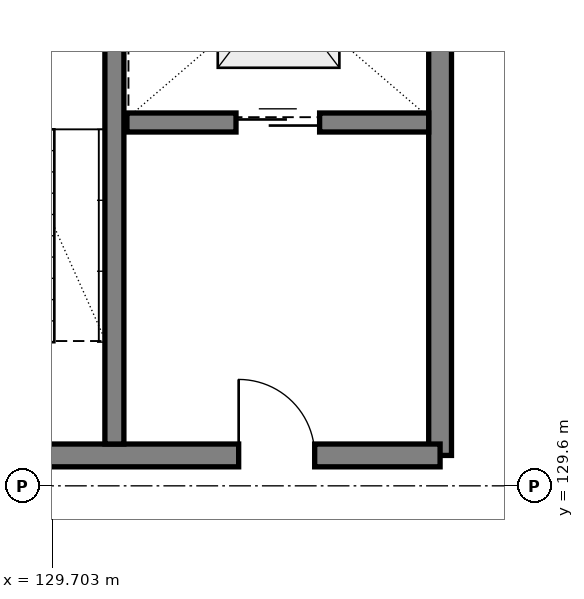
"""IFC4 building model, lengths in metres.
Left out: names, types, materials, properties, quantities, classifications, styles, units other than length and angle.
Written with IfcOpenShell. Run it as: python <this file> out.ifc"""

import sys

from ifc_helpers import new_model, si_unit, direction, frame, frame_2d, origin, place, context, subcontext, project, spatial, rectangle, extrude, element, fill, save


model = new_model("IFC4")
c1 = context("Model", 3, precision=1e-05, world=origin(), true_north=direction((0.0, 1.0)))
c2 = subcontext(c1, "Body", "Model", "MODEL_VIEW")
j1 = project(units=[si_unit("LENGTHUNIT", "METRE"), si_unit("PLANEANGLEUNIT", "RADIAN")], contexts=[c1])
p1 = place(None, origin())
s1 = spatial("IfcSite", under=j1, at=p1, CompositionType="ELEMENT")
p2 = place(p1, origin())
s2 = spatial("IfcBuilding", under=s1, at=p2, CompositionType="ELEMENT")
p3 = place(p2, frame((0.0, 0.0, 4.5)))
s3 = spatial("IfcBuildingStorey", under=s2, at=p3, CompositionType="ELEMENT", Elevation=4.5)
p4 = place(p3, frame((134.8, 130.0, 0.0), z_axis=(0.0, 0.0, 1.0), x_axis=(0.0, 1.0, 0.0)))
e1 = element("IfcWall", 1, at=p4, inside=s3, PredefinedType="SHEAR", context=c2, shape_type="SweptSolid", body=[
    extrude(rectangle(XDim=8.0, YDim=0.3, at=frame_2d((4.0, 0.0), x_axis=(1.0, 0.0))), origin(), (0.0, 0.0, 1.0), 3.9),
])
p5 = place(p3, frame((127.4, 130.0, 0.0), z_axis=(0.0, 0.0, 1.0), x_axis=(1.0, 0.0, 0.0)))
e2 = element("IfcWall", 2, at=p5, inside=s3, PredefinedType="SHEAR", context=c2, shape_type="SweptSolid", body=[
    extrude(rectangle(XDim=7.4, YDim=0.3, at=frame_2d((3.7, 0.0), x_axis=(1.0, 0.0))), origin(), (0.0, 0.0, 1.0), 3.9),
])
p6 = place(p5, frame((1.1, 0.0, 0.0)))
e3 = element("IfcOpeningElement", 3, at=p6, cuts=e2, PredefinedType="OPENING", context=c2, shape_type="SweptSolid", body=[
    extrude(rectangle(XDim=1.0, YDim=2.15, at=frame_2d((0.5, 1.075), x_axis=(1.0, 0.0))), frame((0.0, 0.16, 0.0), z_axis=(0.0, -1.0, 0.0), x_axis=(1.0, 0.0, 0.0)), (0.0, 0.0, 1.0), 0.32),
])
p7 = place(p5, frame((4.75, 0.0, 0.0)))
e4 = element("IfcOpeningElement", 4, at=p7, cuts=e2, PredefinedType="OPENING", context=c2, shape_type="SweptSolid", body=[
    extrude(rectangle(XDim=1.0, YDim=2.15, at=frame_2d((0.5, 1.075), x_axis=(1.0, 0.0))), frame((0.0, 0.16, 0.0), z_axis=(0.0, -1.0, 0.0), x_axis=(1.0, 0.0, 0.0)), (0.0, 0.0, 1.0), 0.32),
])
p8 = place(p3, frame((130.515, 130.15, 0.0), z_axis=(0.0, 0.0, 1.0), x_axis=(0.0, 1.0, 0.0)))
e5 = element("IfcWall", 5, at=p8, inside=s3, PredefinedType="SHEAR", context=c2, shape_type="SweptSolid", body=[
    extrude(rectangle(XDim=7.7, YDim=0.25, at=frame_2d((3.85, 0.0), x_axis=(1.0, 0.0))), origin(), (0.0, 0.0, 1.0), 3.9),
])
p9 = place(p3, frame((130.68, 134.38, 0.0), z_axis=(0.0, 0.0, 1.0), x_axis=(1.0, 0.0, 0.0)))
e6 = element("IfcWall", 6, at=p9, inside=s3, PredefinedType="SHEAR", context=c2, shape_type="SweptSolid", body=[
    extrude(rectangle(XDim=3.97, YDim=0.25, at=frame_2d((1.985, 0.0), x_axis=(1.0, 0.0))), origin(), (0.0, 0.0, 1.0), 3.65),
])
p10 = place(p9, frame((1.435, 0.0, 0.0)))
e7 = element("IfcOpeningElement", 7, at=p10, cuts=e6, PredefinedType="OPENING", context=c2, shape_type="SweptSolid", body=[
    extrude(rectangle(XDim=1.1, YDim=2.15, at=frame_2d((0.55, 1.075), x_axis=(1.0, 0.0))), frame((0.0, 0.135, 0.0), z_axis=(0.0, -1.0, 0.0), x_axis=(1.0, 0.0, 0.0)), (0.0, 0.0, 1.0), 0.27),
])
p11 = place(p7, origin())
e8 = element("IfcDoor", 8, at=p11, inside=s3, OperationType="SINGLE_SWING_LEFT", PredefinedType="DOOR", context=c2, shape_type="SweptSolid", body=[
    extrude(rectangle(XDim=1.0, YDim=2.15, at=frame_2d((0.5, 1.075), x_axis=(1.0, 0.0))), frame((0.0, 0.025, 0.0), z_axis=(0.0, -1.0, 0.0), x_axis=(1.0, 0.0, 0.0)), (0.0, 0.0, 1.0), 0.05),
])
fill(e4, e8)
p12 = place(p10, origin())
e9 = element("IfcDoor", 9, at=p12, inside=s3, OperationType="SLIDING_TO_LEFT", PredefinedType="DOOR", context=c2, shape_type="SweptSolid", body=[
    extrude(rectangle(XDim=1.1, YDim=2.15, at=frame_2d((0.55, 1.075), x_axis=(1.0, 0.0))), frame((0.0, 0.025, 0.0), z_axis=(0.0, -1.0, 0.0), x_axis=(1.0, 0.0, 0.0)), (0.0, 0.0, 1.0), 0.05),
])
fill(e7, e9)
save(model, sys.argv[1])
